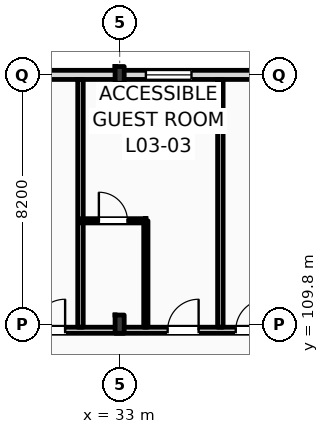
"""IFC4 building model, lengths in metres.
Left out: names, types, materials, properties, quantities, classifications, styles, units other than length and angle.
Written with IfcOpenShell. Run it as: python <this file> out.ifc"""

import sys

from ifc_helpers import new_model, si_unit, direction, frame, frame_2d, origin, origin_2d, place, context, subcontext, project, spatial, rectangle, i_section, extrude, element, fill, save


model = new_model("IFC4")
c1 = context("Model", 3, precision=1e-05, world=origin(), true_north=direction((0.0, 1.0)))
c2 = subcontext(c1, "Body", "Model", "MODEL_VIEW")
j1 = project(units=[si_unit("LENGTHUNIT", "METRE"), si_unit("PLANEANGLEUNIT", "RADIAN")], contexts=[c1])
p1 = place(None, origin())
s1 = spatial("IfcSite", under=j1, at=p1, CompositionType="ELEMENT")
p2 = place(p1, origin())
s2 = spatial("IfcBuilding", under=s1, at=p2, CompositionType="ELEMENT")
p3 = place(p2, frame((0.0, 0.0, 16.2)))
s3 = spatial("IfcBuildingStorey", under=s2, at=p3, CompositionType="ELEMENT", Elevation=16.2)
p4 = place(p3, frame((33.0, 109.8, 0.0), z_axis=(0.0, 0.0, 1.0), x_axis=(1.0, 0.0, 0.0)))
e1 = element("IfcColumn", 1, at=p4, inside=s3, PredefinedType="COLUMN", context=c2, shape_type="SweptSolid", body=[
    extrude(i_section(OverallWidth=0.3, OverallDepth=0.6, WebThickness=0.015, FlangeThickness=0.03, FilletRadius=0.027, at=origin_2d()), origin(), (0.0, 0.0, 1.0), 4.2),
])
p5 = place(p3, frame((33.0, 118.0, 0.0), z_axis=(0.0, 0.0, 1.0), x_axis=(1.0, 0.0, 0.0)))
e2 = element("IfcColumn", 2, at=p5, inside=s3, PredefinedType="COLUMN", context=c2, shape_type="SweptSolid", body=[
    extrude(i_section(OverallWidth=0.3, OverallDepth=0.55, WebThickness=0.015, FlangeThickness=0.029, FilletRadius=0.027, at=origin_2d()), origin(), (0.0, 0.0, 1.0), 4.2),
])
p6 = place(p3, frame((22.5, 118.0, 0.0), z_axis=(0.0, 0.0, 1.0), x_axis=(1.0, 0.0, 0.0)))
e3 = element("IfcWall", 3, at=p6, inside=s3, PredefinedType="STANDARD", context=c2, shape_type="SweptSolid", body=[
    extrude(rectangle(XDim=97.5, YDim=0.3, at=frame_2d((48.75, 0.0))), origin(), (0.0, 0.0, 1.0), 3.36),
])
p7 = place(p6, frame((3.721, 0.0, 0.9)))
e4 = element("IfcOpeningElement", 4, at=p7, cuts=e3, PredefinedType="OPENING", context=c2, shape_type="SweptSolid", body=[
    extrude(rectangle(XDim=0.9, YDim=1.8, at=frame_2d((0.45, 0.9))), frame((0.0, 0.16, 0.0), z_axis=(0.0, -1.0, 0.0), x_axis=(1.0, 0.0, 0.0)), (0.0, 0.0, 1.0), 0.32),
])
p8 = place(p6, frame((6.447, 0.0, 0.9)))
e5 = element("IfcOpeningElement", 5, at=p8, cuts=e3, PredefinedType="OPENING", context=c2, shape_type="SweptSolid", body=[
    extrude(rectangle(XDim=1.35, YDim=1.85, at=frame_2d((0.675, 0.925))), frame((0.0, 0.16, 0.0), z_axis=(0.0, -1.0, 0.0), x_axis=(1.0, 0.0, 0.0)), (0.0, 0.0, 1.0), 0.32),
])
p9 = place(p6, frame((11.363, 0.0, 0.9)))
e6 = element("IfcOpeningElement", 6, at=p9, cuts=e3, PredefinedType="OPENING", context=c2, shape_type="SweptSolid", body=[
    extrude(rectangle(XDim=1.5, YDim=1.9, at=frame_2d((0.75, 0.95))), frame((0.0, 0.16, 0.0), z_axis=(0.0, -1.0, 0.0), x_axis=(1.0, 0.0, 0.0)), (0.0, 0.0, 1.0), 0.32),
])
p10 = place(p6, frame((15.078, 0.0, 0.9)))
e7 = element("IfcOpeningElement", 7, at=p10, cuts=e3, PredefinedType="OPENING", context=c2, shape_type="SweptSolid", body=[
    extrude(rectangle(XDim=1.65, YDim=1.95, at=frame_2d((0.825, 0.975))), frame((0.0, 0.16, 0.0), z_axis=(0.0, -1.0, 0.0), x_axis=(1.0, 0.0, 0.0)), (0.0, 0.0, 1.0), 0.32),
])
p11 = place(p6, frame((19.395, 0.0, 0.9)))
e8 = element("IfcOpeningElement", 8, at=p11, cuts=e3, PredefinedType="OPENING", context=c2, shape_type="SweptSolid", body=[
    extrude(rectangle(XDim=1.8, YDim=2.0, at=frame_2d((0.9, 1.0))), frame((0.0, 0.16, 0.0), z_axis=(0.0, -1.0, 0.0), x_axis=(1.0, 0.0, 0.0)), (0.0, 0.0, 1.0), 0.32),
])
p12 = place(p6, frame((23.31, 0.0, 0.9)))
e9 = element("IfcOpeningElement", 9, at=p12, cuts=e3, PredefinedType="OPENING", context=c2, shape_type="SweptSolid", body=[
    extrude(rectangle(XDim=1.95, YDim=2.05, at=frame_2d((0.975, 1.025))), frame((0.0, 0.16, 0.0), z_axis=(0.0, -1.0, 0.0), x_axis=(1.0, 0.0, 0.0)), (0.0, 0.0, 1.0), 0.32),
])
p13 = place(p6, frame((28.026, 0.0, 0.9)))
e10 = element("IfcOpeningElement", 10, at=p13, cuts=e3, PredefinedType="OPENING", context=c2, shape_type="SweptSolid", body=[
    extrude(rectangle(XDim=2.1, YDim=2.1, at=frame_2d((1.05, 1.05))), frame((0.0, 0.16, 0.0), z_axis=(0.0, -1.0, 0.0), x_axis=(1.0, 0.0, 0.0)), (0.0, 0.0, 1.0), 0.32),
])
p14 = place(p6, frame((31.941, 0.0, 0.9)))
e11 = element("IfcOpeningElement", 11, at=p14, cuts=e3, PredefinedType="OPENING", context=c2, shape_type="SweptSolid", body=[
    extrude(rectangle(XDim=1.1, YDim=2.15, at=frame_2d((0.55, 1.075))), frame((0.0, 0.16, 0.0), z_axis=(0.0, -1.0, 0.0), x_axis=(1.0, 0.0, 0.0)), (0.0, 0.0, 1.0), 0.32),
])
p15 = place(p6, frame((36.657, 0.0, 0.9)))
e12 = element("IfcOpeningElement", 12, at=p15, cuts=e3, PredefinedType="OPENING", context=c2, shape_type="SweptSolid", body=[
    extrude(rectangle(XDim=2.4, YDim=2.2, at=frame_2d((1.2, 1.1))), frame((0.0, 0.16, 0.0), z_axis=(0.0, -1.0, 0.0), x_axis=(1.0, 0.0, 0.0)), (0.0, 0.0, 1.0), 0.32),
])
p16 = place(p6, frame((42.574, 0.0, 0.9)))
e13 = element("IfcOpeningElement", 13, at=p16, cuts=e3, PredefinedType="OPENING", context=c2, shape_type="SweptSolid", body=[
    extrude(rectangle(XDim=1.35, YDim=2.25, at=frame_2d((0.675, 1.125))), frame((0.0, 0.16, 0.0), z_axis=(0.0, -1.0, 0.0), x_axis=(1.0, 0.0, 0.0)), (0.0, 0.0, 1.0), 0.32),
])
p17 = place(p6, frame((45.289, 0.0, 0.9)))
e14 = element("IfcOpeningElement", 14, at=p17, cuts=e3, PredefinedType="OPENING", context=c2, shape_type="SweptSolid", body=[
    extrude(rectangle(XDim=2.7, YDim=2.28, at=frame_2d((1.35, 1.14))), frame((0.0, 0.16, 0.0), z_axis=(0.0, -1.0, 0.0), x_axis=(1.0, 0.0, 0.0)), (0.0, 0.0, 1.0), 0.32),
])
p18 = place(p6, frame((50.406, 0.0, 0.9)))
e15 = element("IfcOpeningElement", 15, at=p18, cuts=e3, PredefinedType="OPENING", context=c2, shape_type="SweptSolid", body=[
    extrude(rectangle(XDim=1.8, YDim=2.28, at=frame_2d((0.9, 1.14))), frame((0.0, 0.16, 0.0), z_axis=(0.0, -1.0, 0.0), x_axis=(1.0, 0.0, 0.0)), (0.0, 0.0, 1.0), 0.32),
])
p19 = place(p6, frame((53.922, 0.0, 0.9)))
e16 = element("IfcOpeningElement", 16, at=p19, cuts=e3, PredefinedType="OPENING", context=c2, shape_type="SweptSolid", body=[
    extrude(rectangle(XDim=1.8, YDim=2.28, at=frame_2d((0.9, 1.14))), frame((0.0, 0.16, 0.0), z_axis=(0.0, -1.0, 0.0), x_axis=(1.0, 0.0, 0.0)), (0.0, 0.0, 1.0), 0.32),
])
p20 = place(p6, frame((58.332, 0.0, 0.9)))
e17 = element("IfcOpeningElement", 17, at=p20, cuts=e3, PredefinedType="OPENING", context=c2, shape_type="SweptSolid", body=[
    extrude(rectangle(XDim=2.961, YDim=2.28, at=frame_2d((1.48, 1.14))), frame((0.0, 0.16, 0.0), z_axis=(0.0, -1.0, 0.0), x_axis=(1.0, 0.0, 0.0)), (0.0, 0.0, 1.0), 0.32),
])
p21 = place(p6, frame((62.513, 0.0, 0.9)))
e18 = element("IfcOpeningElement", 18, at=p21, cuts=e3, PredefinedType="OPENING", context=c2, shape_type="SweptSolid", body=[
    extrude(rectangle(XDim=1.8, YDim=2.28, at=frame_2d((0.9, 1.14))), frame((0.0, 0.16, 0.0), z_axis=(0.0, -1.0, 0.0), x_axis=(1.0, 0.0, 0.0)), (0.0, 0.0, 1.0), 0.32),
])
p22 = place(p6, frame((67.114, 0.0, 0.9)))
e19 = element("IfcOpeningElement", 19, at=p22, cuts=e3, PredefinedType="OPENING", context=c2, shape_type="SweptSolid", body=[
    extrude(rectangle(XDim=2.961, YDim=2.28, at=frame_2d((1.48, 1.14))), frame((0.0, 0.16, 0.0), z_axis=(0.0, -1.0, 0.0), x_axis=(1.0, 0.0, 0.0)), (0.0, 0.0, 1.0), 0.32),
])
p23 = place(p6, frame((73.695, 0.0, 0.9)))
e20 = element("IfcOpeningElement", 20, at=p23, cuts=e3, PredefinedType="OPENING", context=c2, shape_type="SweptSolid", body=[
    extrude(rectangle(XDim=1.1, YDim=2.28, at=frame_2d((0.55, 1.14))), frame((0.0, 0.16, 0.0), z_axis=(0.0, -1.0, 0.0), x_axis=(1.0, 0.0, 0.0)), (0.0, 0.0, 1.0), 0.32),
])
p24 = place(p6, frame((75.895, 0.0, 0.9)))
e21 = element("IfcOpeningElement", 21, at=p24, cuts=e3, PredefinedType="OPENING", context=c2, shape_type="SweptSolid", body=[
    extrude(rectangle(XDim=2.961, YDim=2.28, at=frame_2d((1.48, 1.14))), frame((0.0, 0.16, 0.0), z_axis=(0.0, -1.0, 0.0), x_axis=(1.0, 0.0, 0.0)), (0.0, 0.0, 1.0), 0.32),
])
p25 = place(p6, frame((81.676, 0.0, 0.9)))
e22 = element("IfcOpeningElement", 22, at=p25, cuts=e3, PredefinedType="OPENING", context=c2, shape_type="SweptSolid", body=[
    extrude(rectangle(XDim=1.8, YDim=2.28, at=frame_2d((0.9, 1.14))), frame((0.0, 0.16, 0.0), z_axis=(0.0, -1.0, 0.0), x_axis=(1.0, 0.0, 0.0)), (0.0, 0.0, 1.0), 0.32),
])
p26 = place(p6, frame((84.677, 0.0, 0.9)))
e23 = element("IfcOpeningElement", 23, at=p26, cuts=e3, PredefinedType="OPENING", context=c2, shape_type="SweptSolid", body=[
    extrude(rectangle(XDim=2.961, YDim=2.28, at=frame_2d((1.48, 1.14))), frame((0.0, 0.16, 0.0), z_axis=(0.0, -1.0, 0.0), x_axis=(1.0, 0.0, 0.0)), (0.0, 0.0, 1.0), 0.32),
])
p27 = place(p6, frame((89.999, 0.0, 0.9)))
e24 = element("IfcOpeningElement", 24, at=p27, cuts=e3, PredefinedType="OPENING", context=c2, shape_type="SweptSolid", body=[
    extrude(rectangle(XDim=1.1, YDim=1.5, at=frame_2d((0.55, 0.75))), frame((0.0, 0.16, 0.0), z_axis=(0.0, -1.0, 0.0), x_axis=(1.0, 0.0, 0.0)), (0.0, 0.0, 1.0), 0.32),
])
p28 = place(p6, frame((94.35, 0.0, 0.9)))
e25 = element("IfcOpeningElement", 25, at=p28, cuts=e3, PredefinedType="OPENING", context=c2, shape_type="SweptSolid", body=[
    extrude(rectangle(XDim=1.25, YDim=1.6, at=frame_2d((0.625, 0.8))), frame((0.0, 0.16, 0.0), z_axis=(0.0, -1.0, 0.0), x_axis=(1.0, 0.0, 0.0)), (0.0, 0.0, 1.0), 0.32),
])
p29 = place(p3, frame((10.65, 109.6, 0.0), z_axis=(0.0, 0.0, 1.0), x_axis=(1.0, 0.0, 0.0)))
e26 = element("IfcWall", 26, at=p29, inside=s3, PredefinedType="PARTITIONING", context=c2, shape_type="SweptSolid", body=[
    extrude(rectangle(XDim=109.21, YDim=0.2, at=frame_2d((54.605, 0.0))), origin(), (0.0, 0.0, 1.0), 3.36),
])
p30 = place(p29, frame((15.43, 0.0, 0.0)))
e27 = element("IfcOpeningElement", 27, at=p30, cuts=e26, PredefinedType="OPENING", context=c2, shape_type="SweptSolid", body=[
    extrude(rectangle(XDim=1.02, YDim=2.2, at=frame_2d((0.51, 1.1))), frame((0.0, 0.11, 0.0), z_axis=(0.0, -1.0, 0.0), x_axis=(1.0, 0.0, 0.0)), (0.0, 0.0, 1.0), 0.22),
])
p31 = place(p29, frame((19.537, 0.0, 0.0)))
e28 = element("IfcOpeningElement", 28, at=p31, cuts=e26, PredefinedType="OPENING", context=c2, shape_type="SweptSolid", body=[
    extrude(rectangle(XDim=1.02, YDim=2.2, at=frame_2d((0.51, 1.1))), frame((0.0, 0.11, 0.0), z_axis=(0.0, -1.0, 0.0), x_axis=(1.0, 0.0, 0.0)), (0.0, 0.0, 1.0), 0.22),
])
p32 = place(p29, frame((23.928, 0.0, 0.0)))
e29 = element("IfcOpeningElement", 29, at=p32, cuts=e26, PredefinedType="OPENING", context=c2, shape_type="SweptSolid", body=[
    extrude(rectangle(XDim=1.02, YDim=2.2, at=frame_2d((0.51, 1.1))), frame((0.0, 0.11, 0.0), z_axis=(0.0, -1.0, 0.0), x_axis=(1.0, 0.0, 0.0)), (0.0, 0.0, 1.0), 0.22),
])
p33 = place(p29, frame((26.169, 0.0, 0.0)))
e30 = element("IfcOpeningElement", 30, at=p33, cuts=e26, PredefinedType="OPENING", context=c2, shape_type="SweptSolid", body=[
    extrude(rectangle(XDim=1.02, YDim=2.2, at=frame_2d((0.51, 1.1))), frame((0.0, 0.11, 0.0), z_axis=(0.0, -1.0, 0.0), x_axis=(1.0, 0.0, 0.0)), (0.0, 0.0, 1.0), 0.22),
])
p34 = place(p29, frame((32.739, 0.0, 0.0)))
e31 = element("IfcOpeningElement", 31, at=p34, cuts=e26, PredefinedType="OPENING", context=c2, shape_type="SweptSolid", body=[
    extrude(rectangle(XDim=0.96, YDim=2.2, at=frame_2d((0.48, 1.1))), frame((0.0, 0.11, 0.0), z_axis=(0.0, -1.0, 0.0), x_axis=(1.0, 0.0, 0.0)), (0.0, 0.0, 1.0), 0.22),
])
p35 = place(p29, frame((34.98, 0.0, 0.0)))
e32 = element("IfcOpeningElement", 32, at=p35, cuts=e26, PredefinedType="OPENING", context=c2, shape_type="SweptSolid", body=[
    extrude(rectangle(XDim=0.96, YDim=2.2, at=frame_2d((0.48, 1.1))), frame((0.0, 0.11, 0.0), z_axis=(0.0, -1.0, 0.0), x_axis=(1.0, 0.0, 0.0)), (0.0, 0.0, 1.0), 0.22),
])
p36 = place(p29, frame((41.521, 0.0, 0.0)))
e33 = element("IfcOpeningElement", 33, at=p36, cuts=e26, PredefinedType="OPENING", context=c2, shape_type="SweptSolid", body=[
    extrude(rectangle(XDim=0.96, YDim=2.2, at=frame_2d((0.48, 1.1))), frame((0.0, 0.11, 0.0), z_axis=(0.0, -1.0, 0.0), x_axis=(1.0, 0.0, 0.0)), (0.0, 0.0, 1.0), 0.22),
])
p37 = place(p29, frame((43.512, 0.0, 0.0)))
e34 = element("IfcOpeningElement", 34, at=p37, cuts=e26, PredefinedType="OPENING", context=c2, shape_type="SweptSolid", body=[
    extrude(rectangle(XDim=0.96, YDim=2.2, at=frame_2d((0.48, 1.1))), frame((0.0, 0.11, 0.0), z_axis=(0.0, -1.0, 0.0), x_axis=(1.0, 0.0, 0.0)), (0.0, 0.0, 1.0), 0.22),
])
p38 = place(p29, frame((50.303, 0.0, 0.0)))
e35 = element("IfcOpeningElement", 35, at=p38, cuts=e26, PredefinedType="OPENING", context=c2, shape_type="SweptSolid", body=[
    extrude(rectangle(XDim=0.96, YDim=2.2, at=frame_2d((0.48, 1.1))), frame((0.0, 0.11, 0.0), z_axis=(0.0, -1.0, 0.0), x_axis=(1.0, 0.0, 0.0)), (0.0, 0.0, 1.0), 0.22),
])
p39 = place(p29, frame((54.944, 0.0, 0.0)))
e36 = element("IfcOpeningElement", 36, at=p39, cuts=e26, PredefinedType="OPENING", context=c2, shape_type="SweptSolid", body=[
    extrude(rectangle(XDim=0.96, YDim=2.2, at=frame_2d((0.48, 1.1))), frame((0.0, 0.11, 0.0), z_axis=(0.0, -1.0, 0.0), x_axis=(1.0, 0.0, 0.0)), (0.0, 0.0, 1.0), 0.22),
])
p40 = place(p29, frame((59.085, 0.0, 0.0)))
e37 = element("IfcOpeningElement", 37, at=p40, cuts=e26, PredefinedType="OPENING", context=c2, shape_type="SweptSolid", body=[
    extrude(rectangle(XDim=0.96, YDim=2.2, at=frame_2d((0.48, 1.1))), frame((0.0, 0.11, 0.0), z_axis=(0.0, -1.0, 0.0), x_axis=(1.0, 0.0, 0.0)), (0.0, 0.0, 1.0), 0.22),
])
p41 = place(p29, frame((63.476, 0.0, 0.0)))
e38 = element("IfcOpeningElement", 38, at=p41, cuts=e26, PredefinedType="OPENING", context=c2, shape_type="SweptSolid", body=[
    extrude(rectangle(XDim=0.96, YDim=2.2, at=frame_2d((0.48, 1.1))), frame((0.0, 0.11, 0.0), z_axis=(0.0, -1.0, 0.0), x_axis=(1.0, 0.0, 0.0)), (0.0, 0.0, 1.0), 0.22),
])
p42 = place(p29, frame((65.716, 0.0, 0.0)))
e39 = element("IfcOpeningElement", 39, at=p42, cuts=e26, PredefinedType="OPENING", context=c2, shape_type="SweptSolid", body=[
    extrude(rectangle(XDim=0.96, YDim=2.2, at=frame_2d((0.48, 1.1))), frame((0.0, 0.11, 0.0), z_axis=(0.0, -1.0, 0.0), x_axis=(1.0, 0.0, 0.0)), (0.0, 0.0, 1.0), 0.22),
])
p43 = place(p29, frame((72.257, 0.0, 0.0)))
e40 = element("IfcOpeningElement", 40, at=p43, cuts=e26, PredefinedType="OPENING", context=c2, shape_type="SweptSolid", body=[
    extrude(rectangle(XDim=0.96, YDim=2.2, at=frame_2d((0.48, 1.1))), frame((0.0, 0.11, 0.0), z_axis=(0.0, -1.0, 0.0), x_axis=(1.0, 0.0, 0.0)), (0.0, 0.0, 1.0), 0.22),
])
p44 = place(p29, frame((74.498, 0.0, 0.0)))
e41 = element("IfcOpeningElement", 41, at=p44, cuts=e26, PredefinedType="OPENING", context=c2, shape_type="SweptSolid", body=[
    extrude(rectangle(XDim=0.96, YDim=2.2, at=frame_2d((0.48, 1.1))), frame((0.0, 0.11, 0.0), z_axis=(0.0, -1.0, 0.0), x_axis=(1.0, 0.0, 0.0)), (0.0, 0.0, 1.0), 0.22),
])
p45 = place(p29, frame((81.039, 0.0, 0.0)))
e42 = element("IfcOpeningElement", 42, at=p45, cuts=e26, PredefinedType="OPENING", context=c2, shape_type="SweptSolid", body=[
    extrude(rectangle(XDim=0.96, YDim=2.2, at=frame_2d((0.48, 1.1))), frame((0.0, 0.11, 0.0), z_axis=(0.0, -1.0, 0.0), x_axis=(1.0, 0.0, 0.0)), (0.0, 0.0, 1.0), 0.22),
])
p46 = place(p29, frame((85.68, 0.0, 0.0)))
e43 = element("IfcOpeningElement", 43, at=p46, cuts=e26, PredefinedType="OPENING", context=c2, shape_type="SweptSolid", body=[
    extrude(rectangle(XDim=0.96, YDim=2.2, at=frame_2d((0.48, 1.1))), frame((0.0, 0.11, 0.0), z_axis=(0.0, -1.0, 0.0), x_axis=(1.0, 0.0, 0.0)), (0.0, 0.0, 1.0), 0.22),
])
p47 = place(p29, frame((89.82, 0.0, 0.0)))
e44 = element("IfcOpeningElement", 44, at=p47, cuts=e26, PredefinedType="OPENING", context=c2, shape_type="SweptSolid", body=[
    extrude(rectangle(XDim=0.96, YDim=2.2, at=frame_2d((0.48, 1.1))), frame((0.0, 0.11, 0.0), z_axis=(0.0, -1.0, 0.0), x_axis=(1.0, 0.0, 0.0)), (0.0, 0.0, 1.0), 0.22),
])
p48 = place(p29, frame((94.211, 0.0, 0.0)))
e45 = element("IfcOpeningElement", 45, at=p48, cuts=e26, PredefinedType="OPENING", context=c2, shape_type="SweptSolid", body=[
    extrude(rectangle(XDim=0.96, YDim=2.2, at=frame_2d((0.48, 1.1))), frame((0.0, 0.11, 0.0), z_axis=(0.0, -1.0, 0.0), x_axis=(1.0, 0.0, 0.0)), (0.0, 0.0, 1.0), 0.22),
])
p49 = place(p29, frame((98.602, 0.0, 0.0)))
e46 = element("IfcOpeningElement", 46, at=p49, cuts=e26, PredefinedType="OPENING", context=c2, shape_type="SweptSolid", body=[
    extrude(rectangle(XDim=0.96, YDim=2.2, at=frame_2d((0.48, 1.1))), frame((0.0, 0.11, 0.0), z_axis=(0.0, -1.0, 0.0), x_axis=(1.0, 0.0, 0.0)), (0.0, 0.0, 1.0), 0.22),
])
p50 = place(p29, frame((102.993, 0.0, 0.0)))
e47 = element("IfcOpeningElement", 47, at=p50, cuts=e26, PredefinedType="OPENING", context=c2, shape_type="SweptSolid", body=[
    extrude(rectangle(XDim=0.96, YDim=2.2, at=frame_2d((0.48, 1.1))), frame((0.0, 0.11, 0.0), z_axis=(0.0, -1.0, 0.0), x_axis=(1.0, 0.0, 0.0)), (0.0, 0.0, 1.0), 0.22),
])
p51 = place(p29, frame((105.269, 0.0, 0.0)))
e48 = element("IfcOpeningElement", 48, at=p51, cuts=e26, PredefinedType="OPENING", context=c2, shape_type="SweptSolid", body=[
    extrude(rectangle(XDim=0.96, YDim=2.2, at=frame_2d((0.48, 1.1))), frame((0.0, 0.11, 0.0), z_axis=(0.0, -1.0, 0.0), x_axis=(1.0, 0.0, 0.0)), (0.0, 0.0, 1.0), 0.22),
])
p52 = place(p29, frame((2.716, 0.0, 0.0)))
e49 = element("IfcOpeningElement", 49, at=p52, cuts=e26, PredefinedType="OPENING", context=c2, shape_type="SweptSolid", body=[
    extrude(rectangle(XDim=1.35, YDim=2.25, at=frame_2d((0.675, 1.125))), frame((0.0, 0.11, 0.0), z_axis=(0.0, -1.0, 0.0), x_axis=(1.0, 0.0, 0.0)), (0.0, 0.0, 1.0), 0.22),
])
p53 = place(p29, frame((6.65, 0.0, 0.0)))
e50 = element("IfcOpeningElement", 50, at=p53, cuts=e26, PredefinedType="OPENING", context=c2, shape_type="SweptSolid", body=[
    extrude(rectangle(XDim=1.35, YDim=2.25, at=frame_2d((0.675, 1.125))), frame((0.0, 0.11, 0.0), z_axis=(0.0, -1.0, 0.0), x_axis=(1.0, 0.0, 0.0)), (0.0, 0.0, 1.0), 0.22),
])
p54 = place(p29, frame((10.583, 0.0, 0.0)))
e51 = element("IfcOpeningElement", 51, at=p54, cuts=e26, PredefinedType="OPENING", context=c2, shape_type="SweptSolid", body=[
    extrude(rectangle(XDim=1.35, YDim=2.25, at=frame_2d((0.675, 1.125))), frame((0.0, 0.11, 0.0), z_axis=(0.0, -1.0, 0.0), x_axis=(1.0, 0.0, 0.0)), (0.0, 0.0, 1.0), 0.22),
])
for number, where, z_axis, x_axis in (
    (52, (31.712, 109.7, 0.0), (0.0, 0.0, 1.0), (0.0, 1.0, 0.0)),
    (53, (36.313, 109.7, 0.0), (0.0, 0.0, 1.0), (0.0, 1.0, 0.0)),
):
    element("IfcWall", number, at=place(p3, frame(where, z_axis=z_axis, x_axis=x_axis)), inside=s3, PredefinedType="PARTITIONING", context=c2, shape_type="SweptSolid", body=[
        extrude(rectangle(XDim=8.15, YDim=0.18, at=frame_2d((4.075, 0.0))), origin(), (0.0, 0.0, 1.0), 3.92),
    ])
p55 = place(p3, frame((33.862, 109.7, 0.0), z_axis=(0.0, 0.0, 1.0), x_axis=(0.0, 1.0, 0.0)))
e54 = element("IfcWall", 54, at=p55, inside=s3, PredefinedType="PARTITIONING", context=c2, shape_type="SweptSolid", body=[
    extrude(rectangle(XDim=3.5, YDim=0.14, at=frame_2d((1.75, 0.0))), origin(), (0.0, 0.0, 1.0), 3.92),
])
p56 = place(p3, frame((31.712, 113.2, 0.0), z_axis=(0.0, 0.0, 1.0), x_axis=(1.0, 0.0, 0.0)))
e55 = element("IfcWall", 55, at=p56, inside=s3, PredefinedType="PARTITIONING", context=c2, shape_type="SweptSolid", body=[
    extrude(rectangle(XDim=2.15, YDim=0.14, at=frame_2d((1.075, 0.0))), origin(), (0.0, 0.0, 1.0), 3.92),
])
p57 = place(p56, frame((0.605, 0.0, 0.0)))
e56 = element("IfcOpeningElement", 56, at=p57, cuts=e55, PredefinedType="OPENING", context=c2, shape_type="SweptSolid", body=[
    extrude(rectangle(XDim=0.94, YDim=2.15, at=frame_2d((0.47, 1.075))), frame((0.0, 0.08, 0.0), z_axis=(0.0, -1.0, 0.0), x_axis=(1.0, 0.0, 0.0)), (0.0, 0.0, 1.0), 0.16),
])
p58 = place(p9, origin())
e57 = element("IfcWindow", 57, at=p58, inside=s3, PartitioningType="DOUBLE_PANEL_VERTICAL", PredefinedType="WINDOW", context=c2, shape_type="SweptSolid", body=[
    extrude(rectangle(XDim=1.5, YDim=1.9, at=frame_2d((0.75, 0.95))), frame((0.0, 0.03, 0.0), z_axis=(0.0, -1.0, 0.0), x_axis=(1.0, 0.0, 0.0)), (0.0, 0.0, 1.0), 0.06),
])
fill(e6, e57)
p59 = place(p31, origin())
e58 = element("IfcDoor", 58, at=p59, inside=s3, OperationType="SINGLE_SWING_RIGHT", PredefinedType="DOOR", context=c2, shape_type="SweptSolid", body=[
    extrude(rectangle(XDim=1.02, YDim=2.2, at=frame_2d((0.51, 1.1))), frame((0.0, 0.025, 0.0), z_axis=(0.0, -1.0, 0.0), x_axis=(1.0, 0.0, 0.0)), (0.0, 0.0, 1.0), 0.05),
])
fill(e28, e58)
p60 = place(p32, origin())
e59 = element("IfcDoor", 59, at=p60, inside=s3, OperationType="SINGLE_SWING_RIGHT", PredefinedType="DOOR", context=c2, shape_type="SweptSolid", body=[
    extrude(rectangle(XDim=1.02, YDim=2.2, at=frame_2d((0.51, 1.1))), frame((0.0, 0.025, 0.0), z_axis=(0.0, -1.0, 0.0), x_axis=(1.0, 0.0, 0.0)), (0.0, 0.0, 1.0), 0.05),
])
fill(e29, e59)
p61 = place(p57, origin())
e60 = element("IfcDoor", 60, at=p61, inside=s3, OperationType="SINGLE_SWING_LEFT", PredefinedType="DOOR", context=c2, shape_type="SweptSolid", body=[
    extrude(rectangle(XDim=0.94, YDim=2.15, at=frame_2d((0.47, 1.075))), frame((0.0, 0.025, 0.0), z_axis=(0.0, -1.0, 0.0), x_axis=(1.0, 0.0, 0.0)), (0.0, 0.0, 1.0), 0.05),
])
fill(e56, e60)
p62 = place(p33, origin())
e61 = element("IfcDoor", 61, at=p62, inside=s3, OperationType="SINGLE_SWING_RIGHT", PredefinedType="DOOR", context=c2, shape_type="SweptSolid", body=[
    extrude(rectangle(XDim=1.02, YDim=2.2, at=frame_2d((0.51, 1.1))), frame((0.0, 0.025, 0.0), z_axis=(0.0, -1.0, 0.0), x_axis=(1.0, 0.0, 0.0)), (0.0, 0.0, 1.0), 0.05),
])
fill(e30, e61)
save(model, sys.argv[1])
